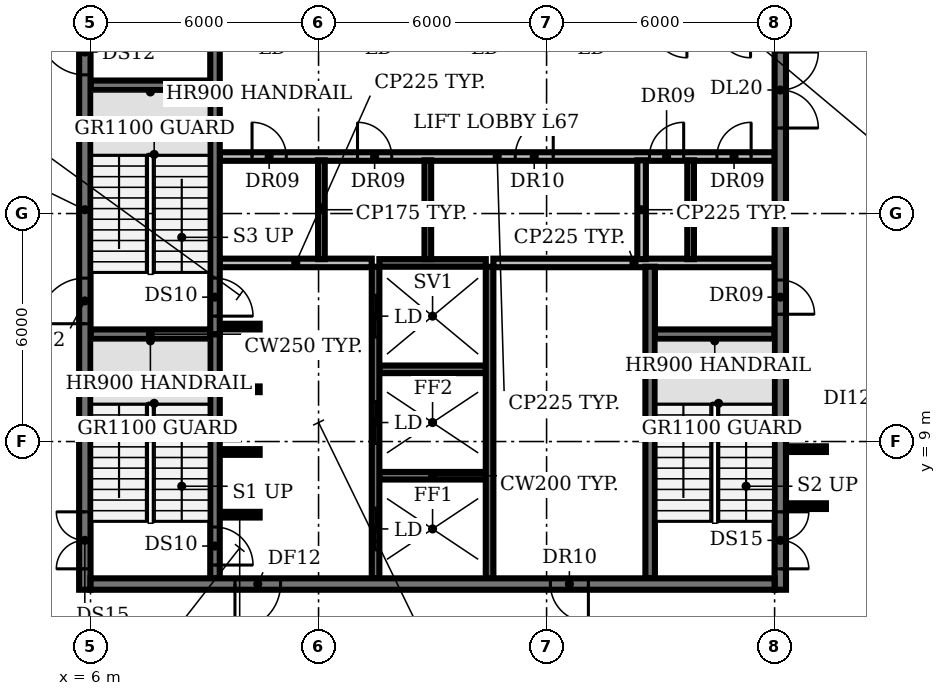
"""IFC4 building model, lengths in metres.
Left out: names, types, materials, properties, quantities, classifications, styles, units other than length and angle.
Written with IfcOpenShell. Run it as: python <this file> out.ifc"""

import sys

from ifc_helpers import new_model, si_unit, direction, frame, frame_2d, origin, place, context, subcontext, project, spatial, rectangle, extrude, element, fill, save


model = new_model("IFC4")
c1 = context("Model", 3, precision=1e-05, world=origin(), true_north=direction((0.0, 1.0)))
c2 = subcontext(c1, "Body", "Model", "MODEL_VIEW")
j1 = project(units=[si_unit("LENGTHUNIT", "METRE"), si_unit("PLANEANGLEUNIT", "RADIAN")], contexts=[c1])
p1 = place(None, origin())
s1 = spatial("IfcSite", under=j1, at=p1, CompositionType="ELEMENT")
p2 = place(p1, origin())
s2 = spatial("IfcBuilding", under=s1, at=p2, CompositionType="ELEMENT")
p3 = place(p2, frame((0.0, 0.0, 302.0)))
s3 = spatial("IfcBuildingStorey", under=s2, at=p3, CompositionType="ELEMENT", Elevation=302.0)
p4 = place(p3, frame((9.4, 7.075, 0.0), z_axis=(0.0, 0.0, 1.0), x_axis=(1.0, 0.0, 0.0)))
e1 = element("IfcWall", 1, at=p4, inside=s3, PredefinedType="SHEAR", context=c2, shape_type="SweptSolid", body=[
    extrude(rectangle(XDim=1.05, YDim=0.15, at=frame_2d((0.525, 0.0))), origin(), (0.0, 0.0, 1.0), 3.85),
])
p5 = place(p3, frame((13.6, 8.1, 0.0), z_axis=(0.0, 0.0, 1.0), x_axis=(1.0, 0.0, 0.0)))
e2 = element("IfcWall", 2, at=p5, inside=s3, PredefinedType="SHEAR", context=c2, shape_type="SweptSolid", body=[
    extrude(rectangle(XDim=2.8, YDim=0.2, at=frame_2d((1.4, 0.0))), origin(), (0.0, 0.0, 1.0), 3.85),
])
for number, where, z_axis, x_axis in (
    (3, (9.4, 8.725, 0.0), (0.0, 0.0, 1.0), (1.0, 0.0, 0.0)),
    (4, (9.4, 10.375, 0.0), (0.0, 0.0, 1.0), (1.0, 0.0, 0.0)),
):
    element("IfcWall", number, at=place(p3, frame(where, z_axis=z_axis, x_axis=x_axis)), inside=s3, PredefinedType="SHEAR", context=c2, shape_type="SweptSolid", body=[
        extrude(rectangle(XDim=1.05, YDim=0.15, at=frame_2d((0.525, 0.0))), origin(), (0.0, 0.0, 1.0), 3.85),
    ])
p6 = place(p3, frame((13.6, 10.9, 0.0), z_axis=(0.0, 0.0, 1.0), x_axis=(1.0, 0.0, 0.0)))
e5 = element("IfcWall", 5, at=p6, inside=s3, PredefinedType="SHEAR", context=c2, shape_type="SweptSolid", body=[
    extrude(rectangle(XDim=2.8, YDim=0.2, at=frame_2d((1.4, 0.0))), origin(), (0.0, 0.0, 1.0), 3.85),
])
for number, where, z_axis, x_axis in (
    (6, (6.0, 11.825, 0.0), (0.0, 0.0, 1.0), (1.0, 0.0, 0.0)),
    (7, (20.85, 11.825, 0.0), (0.0, 0.0, 1.0), (1.0, 0.0, 0.0)),
):
    element("IfcWall", number, at=place(p3, frame(where, z_axis=z_axis, x_axis=x_axis)), inside=s3, PredefinedType="SHEAR", context=c2, shape_type="SweptSolid", body=[
        extrude(rectangle(XDim=3.15, YDim=0.25, at=frame_2d((1.575, 0.0))), origin(), (0.0, 0.0, 1.0), 3.85),
    ])
p7 = place(p3, frame((9.4, 12.025, 0.0), z_axis=(0.0, 0.0, 1.0), x_axis=(1.0, 0.0, 0.0)))
e8 = element("IfcWall", 8, at=p7, inside=s3, PredefinedType="SHEAR", context=c2, shape_type="SweptSolid", body=[
    extrude(rectangle(XDim=1.05, YDim=0.15, at=frame_2d((0.525, 0.0))), origin(), (0.0, 0.0, 1.0), 3.85),
])
p8 = place(p3, frame((9.4, 13.7, 0.0), z_axis=(0.0, 0.0, 1.0), x_axis=(1.0, 0.0, 0.0)))
e9 = element("IfcWall", 9, at=p8, inside=s3, PredefinedType="PARTITIONING", context=c2, shape_type="SweptSolid", body=[
    extrude(rectangle(XDim=4.0, YDim=0.225, at=frame_2d((2.0, 0.0))), origin(), (0.0, 0.0, 1.0), 3.85),
])
p9 = place(p3, frame((13.6, 13.7, 0.0), z_axis=(0.0, 0.0, 1.0), x_axis=(1.0, 0.0, 0.0)))
e10 = element("IfcWall", 10, at=p9, inside=s3, PredefinedType="SHEAR", context=c2, shape_type="SweptSolid", body=[
    extrude(rectangle(XDim=2.8, YDim=0.2, at=frame_2d((1.4, 0.0))), origin(), (0.0, 0.0, 1.0), 3.85),
])
p10 = place(p3, frame((16.6, 13.7, 0.0), z_axis=(0.0, 0.0, 1.0), x_axis=(1.0, 0.0, 0.0)))
e11 = element("IfcWall", 11, at=p10, inside=s3, PredefinedType="PARTITIONING", context=c2, shape_type="SweptSolid", body=[
    extrude(rectangle(XDim=7.4, YDim=0.225, at=frame_2d((3.7, 0.0))), origin(), (0.0, 0.0, 1.0), 3.85),
])
p11 = place(p3, frame((9.4, 16.5, 0.0), z_axis=(0.0, 0.0, 1.0), x_axis=(1.0, 0.0, 0.0)))
e12 = element("IfcWall", 12, at=p11, inside=s3, PredefinedType="PARTITIONING", context=c2, shape_type="SweptSolid", body=[
    extrude(rectangle(XDim=14.6, YDim=0.225, at=frame_2d((7.3, 0.0))), origin(), (0.0, 0.0, 1.0), 3.85),
])
p12 = place(p11, frame((0.85, 0.0, 0.0)))
e13 = element("IfcOpeningElement", 13, at=p12, cuts=e12, PredefinedType="OPENING", context=c2, shape_type="SweptSolid", body=[
    extrude(rectangle(XDim=0.9, YDim=2.1, at=frame_2d((0.45, 1.05))), frame((0.0, 0.123, 0.0), z_axis=(0.0, -1.0, 0.0), x_axis=(1.0, 0.0, 0.0)), (0.0, 0.0, 1.0), 0.245),
])
p13 = place(p11, frame((3.625, 0.0, 0.0)))
e14 = element("IfcOpeningElement", 14, at=p13, cuts=e12, PredefinedType="OPENING", context=c2, shape_type="SweptSolid", body=[
    extrude(rectangle(XDim=0.9, YDim=2.1, at=frame_2d((0.45, 1.05))), frame((0.0, 0.123, 0.0), z_axis=(0.0, -1.0, 0.0), x_axis=(1.0, 0.0, 0.0)), (0.0, 0.0, 1.0), 0.245),
])
p14 = place(p11, frame((7.775, 0.0, 0.0)))
e15 = element("IfcOpeningElement", 15, at=p14, cuts=e12, PredefinedType="OPENING", context=c2, shape_type="SweptSolid", body=[
    extrude(rectangle(XDim=1.0, YDim=2.1, at=frame_2d((0.5, 1.05))), frame((0.0, 0.123, 0.0), z_axis=(0.0, -1.0, 0.0), x_axis=(1.0, 0.0, 0.0)), (0.0, 0.0, 1.0), 0.245),
])
p15 = place(p11, frame((11.308, 0.0, 0.0)))
e16 = element("IfcOpeningElement", 16, at=p15, cuts=e12, PredefinedType="OPENING", context=c2, shape_type="SweptSolid", body=[
    extrude(rectangle(XDim=0.9, YDim=2.1, at=frame_2d((0.45, 1.05))), frame((0.0, 0.123, 0.0), z_axis=(0.0, -1.0, 0.0), x_axis=(1.0, 0.0, 0.0)), (0.0, 0.0, 1.0), 0.245),
])
p16 = place(p11, frame((13.083, 0.0, 0.0)))
e17 = element("IfcOpeningElement", 17, at=p16, cuts=e12, PredefinedType="OPENING", context=c2, shape_type="SweptSolid", body=[
    extrude(rectangle(XDim=0.9, YDim=2.1, at=frame_2d((0.45, 1.05))), frame((0.0, 0.123, 0.0), z_axis=(0.0, -1.0, 0.0), x_axis=(1.0, 0.0, 0.0)), (0.0, 0.0, 1.0), 0.245),
])
p17 = place(p3, frame((6.0, 18.375, 0.0), z_axis=(0.0, 0.0, 1.0), x_axis=(1.0, 0.0, 0.0)))
e18 = element("IfcWall", 18, at=p17, inside=s3, PredefinedType="SHEAR", context=c2, shape_type="SweptSolid", body=[
    extrude(rectangle(XDim=3.15, YDim=0.25, at=frame_2d((1.575, 0.0))), origin(), (0.0, 0.0, 1.0), 3.85),
])
p18 = place(p3, frame((9.275, 11.825, 0.0), z_axis=(0.0, 0.0, 1.0), x_axis=(0.0, -1.0, 0.0)))
e19 = element("IfcWall", 19, at=p18, inside=s3, PredefinedType="SHEAR", context=c2, shape_type="SweptSolid", body=[
    extrude(rectangle(XDim=6.425, YDim=0.25, at=frame_2d((3.212, 0.0))), origin(), (0.0, 0.0, 1.0), 3.85),
])
p19 = place(p18, frame((5.075, 0.0, 0.0)))
e20 = element("IfcOpeningElement", 20, at=p19, cuts=e19, PredefinedType="OPENING", context=c2, shape_type="SweptSolid", body=[
    extrude(rectangle(XDim=1.0, YDim=2.1, at=frame_2d((0.5, 1.05))), frame((0.0, 0.135, 0.0), z_axis=(0.0, -1.0, 0.0), x_axis=(1.0, 0.0, 0.0)), (0.0, 0.0, 1.0), 0.27),
])
p20 = place(p3, frame((9.275, 18.375, 0.0), z_axis=(0.0, 0.0, 1.0), x_axis=(0.0, -1.0, 0.0)))
e21 = element("IfcWall", 21, at=p20, inside=s3, PredefinedType="SHEAR", context=c2, shape_type="SweptSolid", body=[
    extrude(rectangle(XDim=6.55, YDim=0.25, at=frame_2d((3.275, 0.0))), origin(), (0.0, 0.0, 1.0), 3.85),
])
p21 = place(p20, frame((5.075, 0.0, 0.0)))
e22 = element("IfcOpeningElement", 22, at=p21, cuts=e21, PredefinedType="OPENING", context=c2, shape_type="SweptSolid", body=[
    extrude(rectangle(XDim=1.0, YDim=2.1, at=frame_2d((0.5, 1.05))), frame((0.0, 0.135, 0.0), z_axis=(0.0, -1.0, 0.0), x_axis=(1.0, 0.0, 0.0)), (0.0, 0.0, 1.0), 0.27),
])
p22 = place(p3, frame((9.275, 18.375, 0.0), z_axis=(0.0, 0.0, 1.0), x_axis=(0.0, 1.0, 0.0)))
e23 = element("IfcWall", 23, at=p22, inside=s3, PredefinedType="SHEAR", context=c2, shape_type="SweptSolid", body=[
    extrude(rectangle(XDim=6.425, YDim=0.25, at=frame_2d((3.212, 0.0))), origin(), (0.0, 0.0, 1.0), 3.85),
])
p23 = place(p3, frame((12.075, 13.8, 0.0), z_axis=(0.0, 0.0, 1.0), x_axis=(0.0, 1.0, 0.0)))
e24 = element("IfcWall", 24, at=p23, inside=s3, PredefinedType="PARTITIONING", context=c2, shape_type="SweptSolid", body=[
    extrude(rectangle(XDim=2.6, YDim=0.175, at=frame_2d((1.3, 0.0))), origin(), (0.0, 0.0, 1.0), 3.85),
])
p24 = place(p3, frame((13.5, 5.4, 0.0), z_axis=(0.0, 0.0, 1.0), x_axis=(0.0, 1.0, 0.0)))
e25 = element("IfcWall", 25, at=p24, inside=s3, PredefinedType="SHEAR", context=c2, shape_type="SweptSolid", body=[
    extrude(rectangle(XDim=8.2, YDim=0.2, at=frame_2d((4.1, 0.0))), origin(), (0.0, 0.0, 1.0), 3.85),
])
p25 = place(p24, frame((0.75, 0.0, 0.0)))
e26 = element("IfcOpeningElement", 26, at=p25, cuts=e25, PredefinedType="OPENING", context=c2, shape_type="SweptSolid", body=[
    extrude(rectangle(XDim=1.1, YDim=2.1, at=frame_2d((0.55, 1.05))), frame((0.0, 0.11, 0.0), z_axis=(0.0, -1.0, 0.0), x_axis=(1.0, 0.0, 0.0)), (0.0, 0.0, 1.0), 0.22),
])
p26 = place(p24, frame((3.55, 0.0, 0.0)))
e27 = element("IfcOpeningElement", 27, at=p26, cuts=e25, PredefinedType="OPENING", context=c2, shape_type="SweptSolid", body=[
    extrude(rectangle(XDim=1.1, YDim=2.1, at=frame_2d((0.55, 1.05))), frame((0.0, 0.11, 0.0), z_axis=(0.0, -1.0, 0.0), x_axis=(1.0, 0.0, 0.0)), (0.0, 0.0, 1.0), 0.22),
])
p27 = place(p24, frame((6.35, 0.0, 0.0)))
e28 = element("IfcOpeningElement", 28, at=p27, cuts=e25, PredefinedType="OPENING", context=c2, shape_type="SweptSolid", body=[
    extrude(rectangle(XDim=1.1, YDim=2.1, at=frame_2d((0.55, 1.05))), frame((0.0, 0.11, 0.0), z_axis=(0.0, -1.0, 0.0), x_axis=(1.0, 0.0, 0.0)), (0.0, 0.0, 1.0), 0.22),
])
p28 = place(p3, frame((14.875, 13.8, 0.0), z_axis=(0.0, 0.0, 1.0), x_axis=(0.0, 1.0, 0.0)))
e29 = element("IfcWall", 29, at=p28, inside=s3, PredefinedType="PARTITIONING", context=c2, shape_type="SweptSolid", body=[
    extrude(rectangle(XDim=2.6, YDim=0.175, at=frame_2d((1.3, 0.0))), origin(), (0.0, 0.0, 1.0), 3.85),
])
p29 = place(p3, frame((16.5, 5.4, 0.0), z_axis=(0.0, 0.0, 1.0), x_axis=(0.0, 1.0, 0.0)))
e30 = element("IfcWall", 30, at=p29, inside=s3, PredefinedType="SHEAR", context=c2, shape_type="SweptSolid", body=[
    extrude(rectangle(XDim=8.2, YDim=0.2, at=frame_2d((4.1, 0.0))), origin(), (0.0, 0.0, 1.0), 3.85),
])
p30 = place(p3, frame((20.5, 13.8, 0.0), z_axis=(0.0, 0.0, 1.0), x_axis=(0.0, 1.0, 0.0)))
e31 = element("IfcWall", 31, at=p30, inside=s3, PredefinedType="PARTITIONING", context=c2, shape_type="SweptSolid", body=[
    extrude(rectangle(XDim=2.6, YDim=0.225, at=frame_2d((1.3, 0.0))), origin(), (0.0, 0.0, 1.0), 3.85),
])
p31 = place(p3, frame((20.725, 5.4, 0.0), z_axis=(0.0, 0.0, 1.0), x_axis=(0.0, 1.0, 0.0)))
e32 = element("IfcWall", 32, at=p31, inside=s3, PredefinedType="SHEAR", context=c2, shape_type="SweptSolid", body=[
    extrude(rectangle(XDim=8.2, YDim=0.25, at=frame_2d((4.1, 0.0))), origin(), (0.0, 0.0, 1.0), 3.85),
])
p32 = place(p3, frame((21.79, 13.8, 0.0), z_axis=(0.0, 0.0, 1.0), x_axis=(0.0, 1.0, 0.0)))
e33 = element("IfcWall", 33, at=p32, inside=s3, PredefinedType="PARTITIONING", context=c2, shape_type="SweptSolid", body=[
    extrude(rectangle(XDim=2.6, YDim=0.175, at=frame_2d((1.3, 0.0))), origin(), (0.0, 0.0, 1.0), 3.85),
])
p33 = place(p3, frame((5.85, 5.1, 0.0), z_axis=(0.0, 0.0, 1.0), x_axis=(0.0, 1.0, 0.0)))
e34 = element("IfcWall", 34, at=p33, inside=s3, PredefinedType="SHEAR", context=c2, shape_type="SweptSolid", body=[
    extrude(rectangle(XDim=20.0, YDim=0.3, at=frame_2d((10.0, 0.0))), origin(), (0.0, 0.0, 1.0), 3.85),
])
p34 = place(p33, frame((0.55, 0.0, 0.0)))
e35 = element("IfcOpeningElement", 35, at=p34, cuts=e34, PredefinedType="OPENING", context=c2, shape_type="SweptSolid", body=[
    extrude(rectangle(XDim=1.5, YDim=2.1, at=frame_2d((0.75, 1.05))), frame((0.0, 0.16, 0.0), z_axis=(0.0, -1.0, 0.0), x_axis=(1.0, 0.0, 0.0)), (0.0, 0.0, 1.0), 0.32),
])
p35 = place(p33, frame((7.0, 0.0, 0.0)))
e36 = element("IfcOpeningElement", 36, at=p35, cuts=e34, PredefinedType="OPENING", context=c2, shape_type="SweptSolid", body=[
    extrude(rectangle(XDim=1.2, YDim=2.1, at=frame_2d((0.6, 1.05))), frame((0.0, 0.16, 0.0), z_axis=(0.0, -1.0, 0.0), x_axis=(1.0, 0.0, 0.0)), (0.0, 0.0, 1.0), 0.32),
])
p36 = place(p33, frame((13.55, 0.0, 0.0)))
e37 = element("IfcOpeningElement", 37, at=p36, cuts=e34, PredefinedType="OPENING", context=c2, shape_type="SweptSolid", body=[
    extrude(rectangle(XDim=1.2, YDim=2.1, at=frame_2d((0.6, 1.05))), frame((0.0, 0.16, 0.0), z_axis=(0.0, -1.0, 0.0), x_axis=(1.0, 0.0, 0.0)), (0.0, 0.0, 1.0), 0.32),
])
p37 = place(p3, frame((24.15, 25.655, 0.0), z_axis=(0.0, 0.0, 1.0), x_axis=(0.0, -1.0, 0.0)))
e38 = element("IfcWall", 38, at=p37, inside=s3, PredefinedType="SHEAR", context=c2, shape_type="SweptSolid", body=[
    extrude(rectangle(XDim=20.555, YDim=0.3, at=frame_2d((10.277, 0.0))), origin(), (0.0, 0.0, 1.0), 3.85),
])
p38 = place(p37, frame((18.505, 0.0, 0.0)))
e39 = element("IfcOpeningElement", 39, at=p38, cuts=e38, PredefinedType="OPENING", context=c2, shape_type="SweptSolid", body=[
    extrude(rectangle(XDim=1.5, YDim=2.1, at=frame_2d((0.75, 1.05))), frame((0.0, 0.16, 0.0), z_axis=(0.0, -1.0, 0.0), x_axis=(1.0, 0.0, 0.0)), (0.0, 0.0, 1.0), 0.32),
])
p39 = place(p37, frame((12.405, 0.0, 0.0)))
e40 = element("IfcOpeningElement", 40, at=p39, cuts=e38, PredefinedType="OPENING", context=c2, shape_type="SweptSolid", body=[
    extrude(rectangle(XDim=0.9, YDim=2.1, at=frame_2d((0.45, 1.05))), frame((0.0, 0.16, 0.0), z_axis=(0.0, -1.0, 0.0), x_axis=(1.0, 0.0, 0.0)), (0.0, 0.0, 1.0), 0.32),
])
p40 = place(p37, frame((6.405, 0.0, 0.0)))
e41 = element("IfcOpeningElement", 41, at=p40, cuts=e38, PredefinedType="OPENING", context=c2, shape_type="SweptSolid", body=[
    extrude(rectangle(XDim=2.0, YDim=2.1, at=frame_2d((1.0, 1.05))), frame((0.0, 0.16, 0.0), z_axis=(0.0, -1.0, 0.0), x_axis=(1.0, 0.0, 0.0)), (0.0, 0.0, 1.0), 0.32),
])
p41 = place(p3, frame((24.0, 5.25, 0.0), z_axis=(0.0, 0.0, 1.0), x_axis=(-1.0, 0.0, 0.0)))
e42 = element("IfcWall", 42, at=p41, inside=s3, PredefinedType="SHEAR", context=c2, shape_type="SweptSolid", body=[
    extrude(rectangle(XDim=18.0, YDim=0.3, at=frame_2d((9.0, 0.0))), origin(), (0.0, 0.0, 1.0), 3.85),
])
p42 = place(p41, frame((13.0, 0.0, 0.0)))
e43 = element("IfcOpeningElement", 43, at=p42, cuts=e42, PredefinedType="OPENING", context=c2, shape_type="SweptSolid", body=[
    extrude(rectangle(XDim=1.2, YDim=2.1, at=frame_2d((0.6, 1.05))), frame((0.0, 0.16, 0.0), z_axis=(0.0, -1.0, 0.0), x_axis=(1.0, 0.0, 0.0)), (0.0, 0.0, 1.0), 0.32),
])
p43 = place(p41, frame((4.9, 0.0, 0.0)))
e44 = element("IfcOpeningElement", 44, at=p43, cuts=e42, PredefinedType="OPENING", context=c2, shape_type="SweptSolid", body=[
    extrude(rectangle(XDim=1.0, YDim=2.1, at=frame_2d((0.5, 1.05))), frame((0.0, 0.16, 0.0), z_axis=(0.0, -1.0, 0.0), x_axis=(1.0, 0.0, 0.0)), (0.0, 0.0, 1.0), 0.32),
])
for number, where, z_axis, x_axis in (
    (45, (24.3, 7.3, 0.0), (0.0, 0.0, 1.0), (1.0, 0.0, 0.0)),
    (46, (24.3, 8.8, 0.0), (0.0, 0.0, 1.0), (1.0, 0.0, 0.0)),
):
    element("IfcWall", number, at=place(p3, frame(where, z_axis=z_axis, x_axis=x_axis)), inside=s3, PredefinedType="PARTITIONING", context=c2, shape_type="SweptSolid", body=[
        extrude(rectangle(XDim=1.05, YDim=0.15, at=frame_2d((0.525, 0.0))), origin(), (0.0, 0.0, 1.0), 2.9),
    ])
p44 = place(p12, origin())
e47 = element("IfcDoor", 47, at=p44, inside=s3, OperationType="SINGLE_SWING_LEFT", PredefinedType="DOOR", context=c2, shape_type="SweptSolid", body=[
    extrude(rectangle(XDim=0.9, YDim=2.1, at=frame_2d((0.45, 1.05))), frame((0.0, 0.025, 0.0), z_axis=(0.0, -1.0, 0.0), x_axis=(1.0, 0.0, 0.0)), (0.0, 0.0, 1.0), 0.05),
])
fill(e13, e47)
p45 = place(p13, origin())
e48 = element("IfcDoor", 48, at=p45, inside=s3, OperationType="SINGLE_SWING_LEFT", PredefinedType="DOOR", context=c2, shape_type="SweptSolid", body=[
    extrude(rectangle(XDim=0.9, YDim=2.1, at=frame_2d((0.45, 1.05))), frame((0.0, 0.025, 0.0), z_axis=(0.0, -1.0, 0.0), x_axis=(1.0, 0.0, 0.0)), (0.0, 0.0, 1.0), 0.05),
])
fill(e14, e48)
p46 = place(p14, origin())
e49 = element("IfcDoor", 49, at=p46, inside=s3, OperationType="SINGLE_SWING_RIGHT", PredefinedType="DOOR", context=c2, shape_type="SweptSolid", body=[
    extrude(rectangle(XDim=1.0, YDim=2.1, at=frame_2d((0.5, 1.05))), frame((0.0, 0.025, 0.0), z_axis=(0.0, -1.0, 0.0), x_axis=(1.0, 0.0, 0.0)), (0.0, 0.0, 1.0), 0.05),
])
fill(e15, e49)
p47 = place(p15, origin())
e50 = element("IfcDoor", 50, at=p47, inside=s3, OperationType="SINGLE_SWING_RIGHT", PredefinedType="DOOR", context=c2, shape_type="SweptSolid", body=[
    extrude(rectangle(XDim=0.9, YDim=2.1, at=frame_2d((0.45, 1.05))), frame((0.0, 0.025, 0.0), z_axis=(0.0, -1.0, 0.0), x_axis=(1.0, 0.0, 0.0)), (0.0, 0.0, 1.0), 0.05),
])
fill(e16, e50)
p48 = place(p16, origin())
e51 = element("IfcDoor", 51, at=p48, inside=s3, OperationType="SINGLE_SWING_RIGHT", PredefinedType="DOOR", context=c2, shape_type="SweptSolid", body=[
    extrude(rectangle(XDim=0.9, YDim=2.1, at=frame_2d((0.45, 1.05))), frame((0.0, 0.025, 0.0), z_axis=(0.0, -1.0, 0.0), x_axis=(1.0, 0.0, 0.0)), (0.0, 0.0, 1.0), 0.05),
])
fill(e17, e51)
p49 = place(p19, origin())
e52 = element("IfcDoor", 52, at=p49, inside=s3, OperationType="SINGLE_SWING_RIGHT", PredefinedType="DOOR", context=c2, shape_type="SweptSolid", body=[
    extrude(rectangle(XDim=1.0, YDim=2.1, at=frame_2d((0.5, 1.05))), frame((0.0, 0.025, 0.0), z_axis=(0.0, -1.0, 0.0), x_axis=(1.0, 0.0, 0.0)), (0.0, 0.0, 1.0), 0.05),
])
fill(e20, e52)
p50 = place(p21, origin())
e53 = element("IfcDoor", 53, at=p50, inside=s3, OperationType="SINGLE_SWING_RIGHT", PredefinedType="DOOR", context=c2, shape_type="SweptSolid", body=[
    extrude(rectangle(XDim=1.0, YDim=2.1, at=frame_2d((0.5, 1.05))), frame((0.0, 0.025, 0.0), z_axis=(0.0, -1.0, 0.0), x_axis=(1.0, 0.0, 0.0)), (0.0, 0.0, 1.0), 0.05),
])
fill(e22, e53)
p51 = place(p25, origin())
e54 = element("IfcDoor", 54, at=p51, inside=s3, OperationType="DOUBLE_DOOR_SLIDING", PredefinedType="DOOR", context=c2, shape_type="SweptSolid", body=[
    extrude(rectangle(XDim=1.1, YDim=2.1, at=frame_2d((0.55, 1.05))), frame((0.0, 0.025, 0.0), z_axis=(0.0, -1.0, 0.0), x_axis=(1.0, 0.0, 0.0)), (0.0, 0.0, 1.0), 0.05),
])
fill(e26, e54)
p52 = place(p26, origin())
e55 = element("IfcDoor", 55, at=p52, inside=s3, OperationType="DOUBLE_DOOR_SLIDING", PredefinedType="DOOR", context=c2, shape_type="SweptSolid", body=[
    extrude(rectangle(XDim=1.1, YDim=2.1, at=frame_2d((0.55, 1.05))), frame((0.0, 0.025, 0.0), z_axis=(0.0, -1.0, 0.0), x_axis=(1.0, 0.0, 0.0)), (0.0, 0.0, 1.0), 0.05),
])
fill(e27, e55)
p53 = place(p27, origin())
e56 = element("IfcDoor", 56, at=p53, inside=s3, OperationType="DOUBLE_DOOR_SLIDING", PredefinedType="DOOR", context=c2, shape_type="SweptSolid", body=[
    extrude(rectangle(XDim=1.1, YDim=2.1, at=frame_2d((0.55, 1.05))), frame((0.0, 0.025, 0.0), z_axis=(0.0, -1.0, 0.0), x_axis=(1.0, 0.0, 0.0)), (0.0, 0.0, 1.0), 0.05),
])
fill(e28, e56)
p54 = place(p34, origin())
e57 = element("IfcDoor", 57, at=p54, inside=s3, OperationType="DOUBLE_DOOR_SINGLE_SWING", PredefinedType="DOOR", context=c2, shape_type="SweptSolid", body=[
    extrude(rectangle(XDim=1.5, YDim=2.1, at=frame_2d((0.75, 1.05))), frame((0.0, 0.025, 0.0), z_axis=(0.0, -1.0, 0.0), x_axis=(1.0, 0.0, 0.0)), (0.0, 0.0, 1.0), 0.05),
])
fill(e35, e57)
p55 = place(p35, origin())
e58 = element("IfcDoor", 58, at=p55, inside=s3, OperationType="SINGLE_SWING_LEFT", PredefinedType="DOOR", context=c2, shape_type="SweptSolid", body=[
    extrude(rectangle(XDim=1.2, YDim=2.1, at=frame_2d((0.6, 1.05))), frame((0.0, 0.025, 0.0), z_axis=(0.0, -1.0, 0.0), x_axis=(1.0, 0.0, 0.0)), (0.0, 0.0, 1.0), 0.05),
])
fill(e36, e58)
p56 = place(p36, origin())
e59 = element("IfcDoor", 59, at=p56, inside=s3, OperationType="SINGLE_SWING_RIGHT", PredefinedType="DOOR", context=c2, shape_type="SweptSolid", body=[
    extrude(rectangle(XDim=1.2, YDim=2.1, at=frame_2d((0.6, 1.05))), frame((0.0, 0.025, 0.0), z_axis=(0.0, -1.0, 0.0), x_axis=(1.0, 0.0, 0.0)), (0.0, 0.0, 1.0), 0.05),
])
fill(e37, e59)
p57 = place(p38, origin())
e60 = element("IfcDoor", 60, at=p57, inside=s3, OperationType="DOUBLE_DOOR_SINGLE_SWING", PredefinedType="DOOR", context=c2, shape_type="SweptSolid", body=[
    extrude(rectangle(XDim=1.5, YDim=2.1, at=frame_2d((0.75, 1.05))), frame((0.0, 0.025, 0.0), z_axis=(0.0, -1.0, 0.0), x_axis=(1.0, 0.0, 0.0)), (0.0, 0.0, 1.0), 0.05),
])
fill(e39, e60)
p58 = place(p39, origin())
e61 = element("IfcDoor", 61, at=p58, inside=s3, OperationType="SINGLE_SWING_RIGHT", PredefinedType="DOOR", context=c2, shape_type="SweptSolid", body=[
    extrude(rectangle(XDim=0.9, YDim=2.1, at=frame_2d((0.45, 1.05))), frame((0.0, 0.025, 0.0), z_axis=(0.0, -1.0, 0.0), x_axis=(1.0, 0.0, 0.0)), (0.0, 0.0, 1.0), 0.05),
])
fill(e40, e61)
p59 = place(p40, origin())
e62 = element("IfcDoor", 62, at=p59, inside=s3, OperationType="DOUBLE_DOOR_SINGLE_SWING", PredefinedType="DOOR", context=c2, shape_type="SweptSolid", body=[
    extrude(rectangle(XDim=2.0, YDim=2.1, at=frame_2d((1.0, 1.05))), frame((0.0, 0.025, 0.0), z_axis=(0.0, -1.0, 0.0), x_axis=(1.0, 0.0, 0.0)), (0.0, 0.0, 1.0), 0.05),
])
fill(e41, e62)
p60 = place(p42, origin())
e63 = element("IfcDoor", 63, at=p60, inside=s3, OperationType="SINGLE_SWING_RIGHT", PredefinedType="DOOR", context=c2, shape_type="SweptSolid", body=[
    extrude(rectangle(XDim=1.2, YDim=2.1, at=frame_2d((0.6, 1.05))), frame((0.0, 0.025, 0.0), z_axis=(0.0, -1.0, 0.0), x_axis=(1.0, 0.0, 0.0)), (0.0, 0.0, 1.0), 0.05),
])
fill(e43, e63)
p61 = place(p43, origin())
e64 = element("IfcDoor", 64, at=p61, inside=s3, OperationType="SINGLE_SWING_LEFT", PredefinedType="DOOR", context=c2, shape_type="SweptSolid", body=[
    extrude(rectangle(XDim=1.0, YDim=2.1, at=frame_2d((0.5, 1.05))), frame((0.0, 0.025, 0.0), z_axis=(0.0, -1.0, 0.0), x_axis=(1.0, 0.0, 0.0)), (0.0, 0.0, 1.0), 0.05),
])
fill(e44, e64)
save(model, sys.argv[1])
